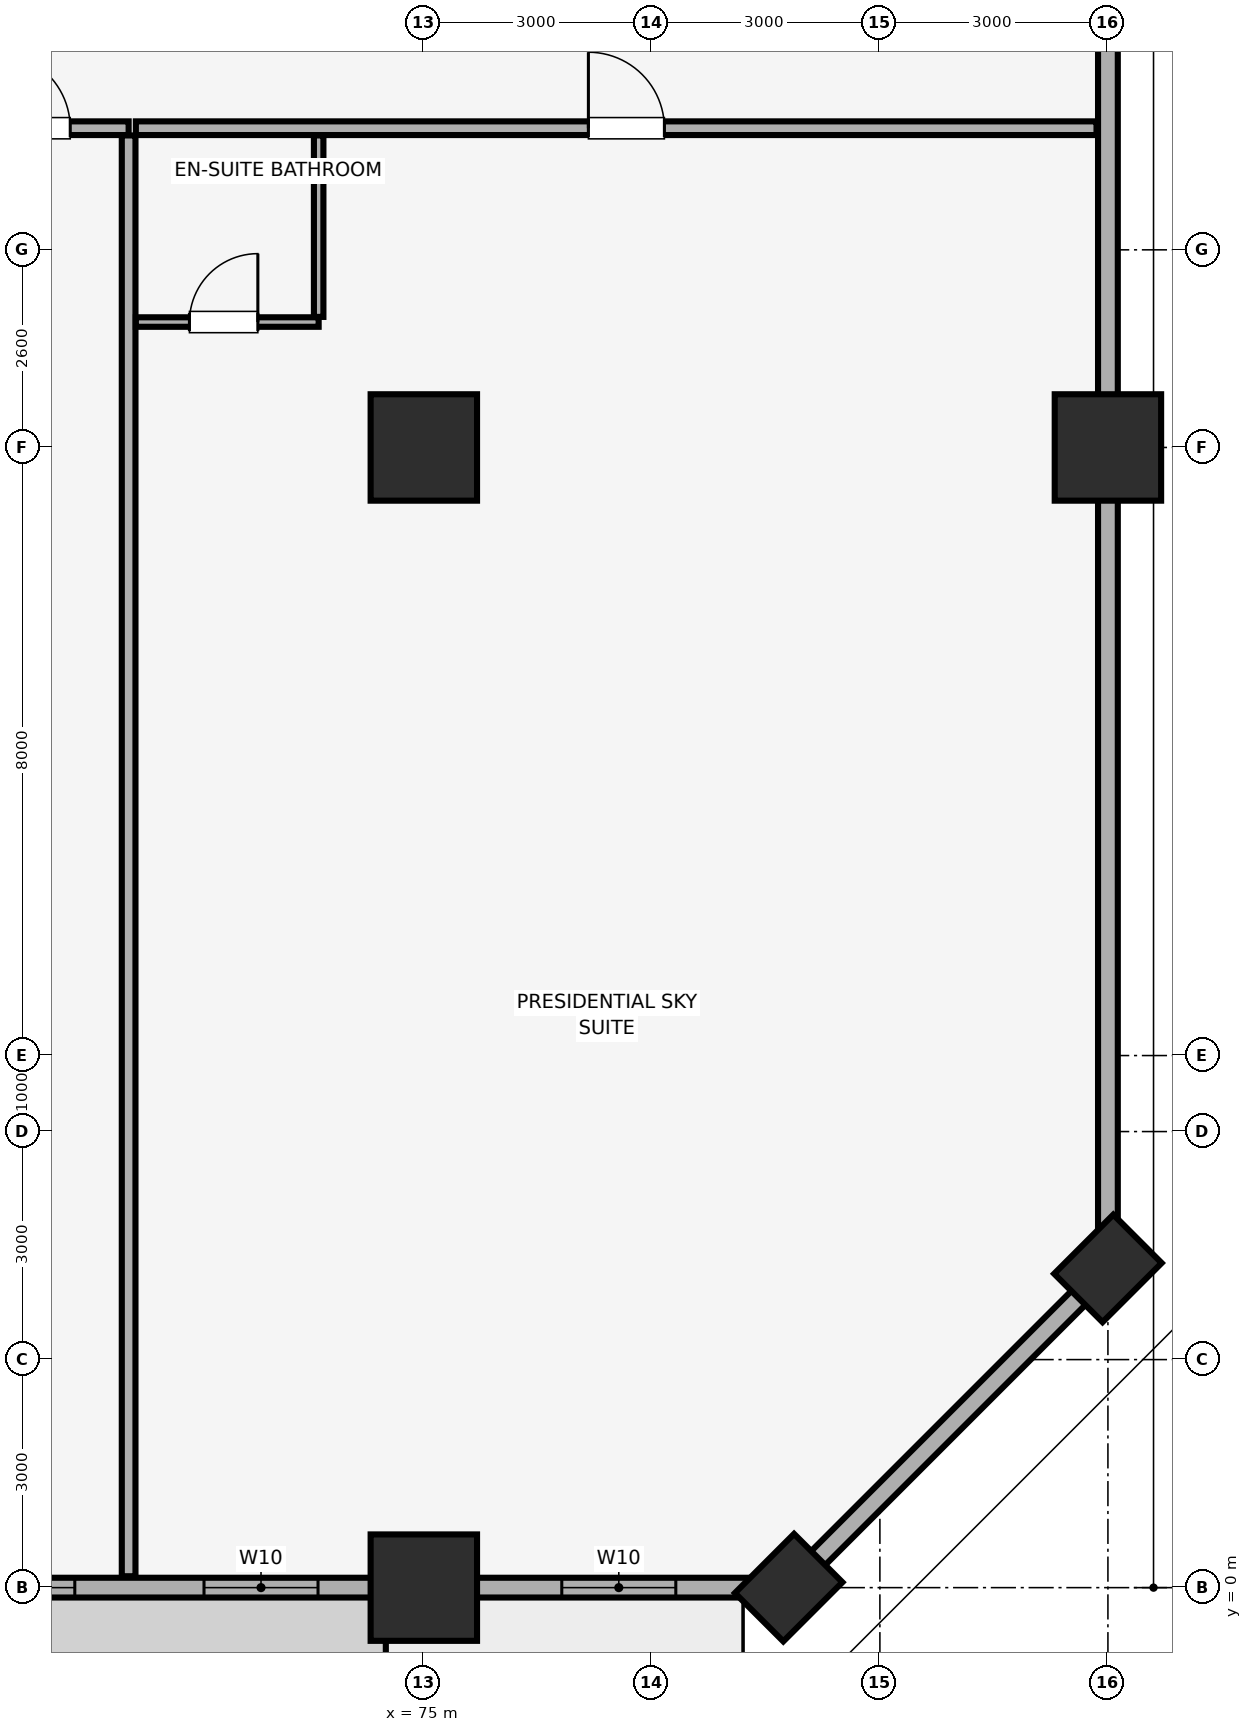
"""IFC4 building model, lengths in metres.
Left out: names, types, materials, properties, quantities, classifications, styles, units other than length and angle.
Written with IfcOpenShell. Run it as: python <this file> out.ifc"""

import sys

from ifc_helpers import new_model, si_unit, direction, frame, frame_2d, origin, origin_2d, place, context, subcontext, project, spatial, rectangle, extrude, element, fill, save


model = new_model("IFC4")
c1 = context("Model", 3, precision=1e-05, world=origin(), true_north=direction((0.0, 1.0)))
c2 = subcontext(c1, "Body", "Model", "MODEL_VIEW")
j1 = project(units=[si_unit("LENGTHUNIT", "METRE"), si_unit("PLANEANGLEUNIT", "RADIAN")], contexts=[c1])
p1 = place(None, origin())
s1 = spatial("IfcSite", under=j1, at=p1, CompositionType="ELEMENT")
p2 = place(p1, origin())
s2 = spatial("IfcBuilding", under=s1, at=p2, CompositionType="ELEMENT")
p3 = place(p2, frame((0.0, 0.0, 76.4)))
s3 = spatial("IfcBuildingStorey", under=s2, at=p3, CompositionType="ELEMENT", Elevation=76.4)
for number, where, z_axis, x_axis in (
    (1, (75.0, 0.0, 0.0), (0.0, 0.0, 1.0), (1.0, 0.0, 0.0)),
    (2, (84.0, 15.0, 0.0), (0.0, 0.0, 1.0), (1.0, 0.0, 0.0)),
):
    element("IfcColumn", number, at=place(p3, frame(where, z_axis=z_axis, x_axis=x_axis)), inside=s3, PredefinedType="COLUMN", context=c2, shape_type="SweptSolid", body=[
        extrude(rectangle(XDim=1.4, YDim=1.4, at=origin_2d()), origin(), (0.0, 0.0, 1.0), 3.4),
    ])
for number, where, z_axis, x_axis in (
    (3, (79.8, 0.0, 0.0), (0.0, 0.0, 1.0), (0.707, 0.707, 0.0)),
    (4, (84.0, 4.2, 0.0), (0.0, 0.0, 1.0), (0.707, 0.707, 0.0)),
):
    element("IfcColumn", number, at=place(p3, frame(where, z_axis=z_axis, x_axis=x_axis)), inside=s3, PredefinedType="PILASTER", context=c2, shape_type="SweptSolid", body=[
        extrude(rectangle(XDim=1.1, YDim=0.9, at=origin_2d()), origin(), (0.0, 0.0, 1.0), 3.4),
    ])
p4 = place(p3, frame((75.0, 15.0, 0.0), z_axis=(0.0, 0.0, 1.0), x_axis=(1.0, 0.0, 0.0)))
e5 = element("IfcColumn", 5, at=p4, inside=s3, PredefinedType="COLUMN", context=c2, shape_type="SweptSolid", body=[
    extrude(rectangle(XDim=1.4, YDim=1.4, at=origin_2d()), origin(), (0.0, 0.0, 1.0), 3.4),
])
p5 = place(p3, frame((4.2, 0.0, 0.0), z_axis=(0.0, 0.0, 1.0), x_axis=(1.0, 0.0, 0.0)))
e6 = element("IfcWall", 6, at=p5, inside=s3, PredefinedType="SOLIDWALL", context=c2, shape_type="SweptSolid", body=[
    extrude(rectangle(XDim=75.6, YDim=0.26, at=frame_2d((37.8, 0.0))), origin(), (0.0, 0.0, 1.0), 2.45),
])
p6 = place(p5, frame((21.383, 0.0, 0.0)))
e7 = element("IfcOpeningElement", 7, at=p6, cuts=e6, PredefinedType="OPENING", context=c2, shape_type="SweptSolid", body=[
    extrude(rectangle(XDim=1.1, YDim=2.15, at=frame_2d((0.55, 1.075))), frame((0.0, 0.14, 0.0), z_axis=(0.0, -1.0, 0.0), x_axis=(1.0, 0.0, 0.0)), (0.0, 0.0, 1.0), 0.28),
])
p7 = place(p5, frame((37.25, 0.0, 0.0)))
e8 = element("IfcOpeningElement", 8, at=p7, cuts=e6, PredefinedType="OPENING", context=c2, shape_type="SweptSolid", body=[
    extrude(rectangle(XDim=1.1, YDim=2.15, at=frame_2d((0.55, 1.075))), frame((0.0, 0.14, 0.0), z_axis=(0.0, -1.0, 0.0), x_axis=(1.0, 0.0, 0.0)), (0.0, 0.0, 1.0), 0.28),
])
p8 = place(p5, frame((53.117, 0.0, 0.0)))
e9 = element("IfcOpeningElement", 9, at=p8, cuts=e6, PredefinedType="OPENING", context=c2, shape_type="SweptSolid", body=[
    extrude(rectangle(XDim=1.1, YDim=2.15, at=frame_2d((0.55, 1.075))), frame((0.0, 0.14, 0.0), z_axis=(0.0, -1.0, 0.0), x_axis=(1.0, 0.0, 0.0)), (0.0, 0.0, 1.0), 0.28),
])
p9 = place(p5, frame((1.485, 0.0, 0.85)))
e10 = element("IfcOpeningElement", 10, at=p9, cuts=e6, PredefinedType="OPENING", context=c2, shape_type="SweptSolid", body=[
    extrude(rectangle(XDim=1.5, YDim=1.4, at=frame_2d((0.75, 0.7))), frame((0.0, 0.14, 0.0), z_axis=(0.0, -1.0, 0.0), x_axis=(1.0, 0.0, 0.0)), (0.0, 0.0, 1.0), 0.28),
])
p10 = place(p5, frame((6.142, 0.0, 0.85)))
e11 = element("IfcOpeningElement", 11, at=p10, cuts=e6, PredefinedType="OPENING", context=c2, shape_type="SweptSolid", body=[
    extrude(rectangle(XDim=1.5, YDim=1.4, at=frame_2d((0.75, 0.7))), frame((0.0, 0.14, 0.0), z_axis=(0.0, -1.0, 0.0), x_axis=(1.0, 0.0, 0.0)), (0.0, 0.0, 1.0), 0.28),
])
p11 = place(p5, frame((9.342, 0.0, 0.85)))
e12 = element("IfcOpeningElement", 12, at=p11, cuts=e6, PredefinedType="OPENING", context=c2, shape_type="SweptSolid", body=[
    extrude(rectangle(XDim=1.5, YDim=1.4, at=frame_2d((0.75, 0.7))), frame((0.0, 0.14, 0.0), z_axis=(0.0, -1.0, 0.0), x_axis=(1.0, 0.0, 0.0)), (0.0, 0.0, 1.0), 0.28),
])
p12 = place(p5, frame((13.908, 0.0, 0.85)))
e13 = element("IfcOpeningElement", 13, at=p12, cuts=e6, PredefinedType="OPENING", context=c2, shape_type="SweptSolid", body=[
    extrude(rectangle(XDim=1.5, YDim=1.4, at=frame_2d((0.75, 0.7))), frame((0.0, 0.14, 0.0), z_axis=(0.0, -1.0, 0.0), x_axis=(1.0, 0.0, 0.0)), (0.0, 0.0, 1.0), 0.28),
])
p13 = place(p5, frame((23.202, 0.0, 0.85)))
e14 = element("IfcOpeningElement", 14, at=p13, cuts=e6, PredefinedType="OPENING", context=c2, shape_type="SweptSolid", body=[
    extrude(rectangle(XDim=1.5, YDim=1.4, at=frame_2d((0.75, 0.7))), frame((0.0, 0.14, 0.0), z_axis=(0.0, -1.0, 0.0), x_axis=(1.0, 0.0, 0.0)), (0.0, 0.0, 1.0), 0.28),
])
p14 = place(p5, frame((29.25, 0.0, 0.85)))
e15 = element("IfcOpeningElement", 15, at=p14, cuts=e6, PredefinedType="OPENING", context=c2, shape_type="SweptSolid", body=[
    extrude(rectangle(XDim=1.5, YDim=1.4, at=frame_2d((0.75, 0.7))), frame((0.0, 0.14, 0.0), z_axis=(0.0, -1.0, 0.0), x_axis=(1.0, 0.0, 0.0)), (0.0, 0.0, 1.0), 0.28),
])
p15 = place(p5, frame((34.79, 0.0, 0.85)))
e16 = element("IfcOpeningElement", 16, at=p15, cuts=e6, PredefinedType="OPENING", context=c2, shape_type="SweptSolid", body=[
    extrude(rectangle(XDim=1.5, YDim=1.4, at=frame_2d((0.75, 0.7))), frame((0.0, 0.14, 0.0), z_axis=(0.0, -1.0, 0.0), x_axis=(1.0, 0.0, 0.0)), (0.0, 0.0, 1.0), 0.28),
])
p16 = place(p5, frame((39.31, 0.0, 0.85)))
e17 = element("IfcOpeningElement", 17, at=p16, cuts=e6, PredefinedType="OPENING", context=c2, shape_type="SweptSolid", body=[
    extrude(rectangle(XDim=1.5, YDim=1.4, at=frame_2d((0.75, 0.7))), frame((0.0, 0.14, 0.0), z_axis=(0.0, -1.0, 0.0), x_axis=(1.0, 0.0, 0.0)), (0.0, 0.0, 1.0), 0.28),
])
p17 = place(p5, frame((44.85, 0.0, 0.85)))
e18 = element("IfcOpeningElement", 18, at=p17, cuts=e6, PredefinedType="OPENING", context=c2, shape_type="SweptSolid", body=[
    extrude(rectangle(XDim=1.5, YDim=1.4, at=frame_2d((0.75, 0.7))), frame((0.0, 0.14, 0.0), z_axis=(0.0, -1.0, 0.0), x_axis=(1.0, 0.0, 0.0)), (0.0, 0.0, 1.0), 0.28),
])
p18 = place(p5, frame((50.848, 0.0, 0.85)))
e19 = element("IfcOpeningElement", 19, at=p18, cuts=e6, PredefinedType="OPENING", context=c2, shape_type="SweptSolid", body=[
    extrude(rectangle(XDim=1.5, YDim=1.4, at=frame_2d((0.75, 0.7))), frame((0.0, 0.14, 0.0), z_axis=(0.0, -1.0, 0.0), x_axis=(1.0, 0.0, 0.0)), (0.0, 0.0, 1.0), 0.28),
])
p19 = place(p5, frame((60.142, 0.0, 0.85)))
e20 = element("IfcOpeningElement", 20, at=p19, cuts=e6, PredefinedType="OPENING", context=c2, shape_type="SweptSolid", body=[
    extrude(rectangle(XDim=1.5, YDim=1.4, at=frame_2d((0.75, 0.7))), frame((0.0, 0.14, 0.0), z_axis=(0.0, -1.0, 0.0), x_axis=(1.0, 0.0, 0.0)), (0.0, 0.0, 1.0), 0.28),
])
p20 = place(p5, frame((64.708, 0.0, 0.85)))
e21 = element("IfcOpeningElement", 21, at=p20, cuts=e6, PredefinedType="OPENING", context=c2, shape_type="SweptSolid", body=[
    extrude(rectangle(XDim=1.5, YDim=1.4, at=frame_2d((0.75, 0.7))), frame((0.0, 0.14, 0.0), z_axis=(0.0, -1.0, 0.0), x_axis=(1.0, 0.0, 0.0)), (0.0, 0.0, 1.0), 0.28),
])
p21 = place(p5, frame((67.908, 0.0, 0.85)))
e22 = element("IfcOpeningElement", 22, at=p21, cuts=e6, PredefinedType="OPENING", context=c2, shape_type="SweptSolid", body=[
    extrude(rectangle(XDim=1.5, YDim=1.4, at=frame_2d((0.75, 0.7))), frame((0.0, 0.14, 0.0), z_axis=(0.0, -1.0, 0.0), x_axis=(1.0, 0.0, 0.0)), (0.0, 0.0, 1.0), 0.28),
])
p22 = place(p5, frame((72.615, 0.0, 0.85)))
e23 = element("IfcOpeningElement", 23, at=p22, cuts=e6, PredefinedType="OPENING", context=c2, shape_type="SweptSolid", body=[
    extrude(rectangle(XDim=1.5, YDim=1.4, at=frame_2d((0.75, 0.7))), frame((0.0, 0.14, 0.0), z_axis=(0.0, -1.0, 0.0), x_axis=(1.0, 0.0, 0.0)), (0.0, 0.0, 1.0), 0.28),
])
p23 = place(p3, frame((79.8, 0.0, 0.0), z_axis=(0.0, 0.0, 1.0), x_axis=(0.707106781187, 0.707106781187, 0.0)))
e24 = element("IfcWall", 24, at=p23, inside=s3, PredefinedType="SOLIDWALL", context=c2, shape_type="SweptSolid", body=[
    extrude(rectangle(XDim=5.94, YDim=0.26, at=frame_2d((2.97, 0.0))), origin(), (0.0, 0.0, 1.0), 2.45),
])
p24 = place(p3, frame((84.0, 4.2, 0.0), z_axis=(0.0, 0.0, 1.0), x_axis=(0.0, 1.0, 0.0)))
e25 = element("IfcWall", 25, at=p24, inside=s3, PredefinedType="SOLIDWALL", context=c2, shape_type="SweptSolid", body=[
    extrude(rectangle(XDim=40.6, YDim=0.26, at=frame_2d((20.3, 0.0))), origin(), (0.0, 0.0, 1.0), 2.45),
])
p25 = place(p3, frame((62.878, 19.2, 0.0), z_axis=(0.0, 0.0, 1.0), x_axis=(1.0, 0.0, 0.0)))
e26 = element("IfcWall", 26, at=p25, inside=s3, PredefinedType="PARTITIONING", context=c2, shape_type="SweptSolid", body=[
    extrude(rectangle(XDim=8.238, YDim=0.18, at=frame_2d((4.119, 0.0))), origin(), (0.0, 0.0, 1.0), 3.4),
])
p26 = place(p25, frame((6.47, 0.0, 0.0)))
e27 = element("IfcOpeningElement", 27, at=p26, cuts=e26, PredefinedType="OPENING", context=c2, shape_type="SweptSolid", body=[
    extrude(rectangle(XDim=1.0, YDim=2.15, at=frame_2d((0.5, 1.075))), frame((0.0, 0.1, 0.0), z_axis=(0.0, -1.0, 0.0), x_axis=(1.0, 0.0, 0.0)), (0.0, 0.0, 1.0), 0.2),
])
p27 = place(p3, frame((71.116, 0.15, 0.0), z_axis=(0.0, 0.0, 1.0), x_axis=(0.0, 1.0, 0.0)))
e28 = element("IfcWall", 28, at=p27, inside=s3, PredefinedType="PARTITIONING", context=c2, shape_type="SweptSolid", body=[
    extrude(rectangle(XDim=18.955, YDim=0.18, at=frame_2d((9.478, 0.0))), origin(), (0.0, 0.0, 1.0), 3.4),
])
p28 = place(p3, frame((71.211, 19.2, 0.0), z_axis=(0.0, 0.0, 1.0), x_axis=(1.0, 0.0, 0.0)))
e29 = element("IfcWall", 29, at=p28, inside=s3, PredefinedType="PARTITIONING", context=c2, shape_type="SweptSolid", body=[
    extrude(rectangle(XDim=12.639, YDim=0.18, at=frame_2d((6.319, 0.0))), origin(), (0.0, 0.0, 1.0), 3.4),
])
p29 = place(p28, frame((5.954, 0.0, 0.0)))
e30 = element("IfcOpeningElement", 30, at=p29, cuts=e29, PredefinedType="OPENING", context=c2, shape_type="SweptSolid", body=[
    extrude(rectangle(XDim=1.0, YDim=2.15, at=frame_2d((0.5, 1.075))), frame((0.0, 0.1, 0.0), z_axis=(0.0, -1.0, 0.0), x_axis=(1.0, 0.0, 0.0)), (0.0, 0.0, 1.0), 0.2),
])
p30 = place(p3, frame((71.211, 16.65, 0.0), z_axis=(0.0, 0.0, 1.0), x_axis=(1.0, 0.0, 0.0)))
e31 = element("IfcWall", 31, at=p30, inside=s3, PredefinedType="PARTITIONING", context=c2, shape_type="SweptSolid", body=[
    extrude(rectangle(XDim=2.405, YDim=0.125, at=frame_2d((1.203, 0.0))), origin(), (0.0, 0.0, 1.0), 3.4),
])
p31 = place(p30, frame((0.705, 0.0, 0.0)))
e32 = element("IfcOpeningElement", 32, at=p31, cuts=e31, PredefinedType="OPENING", context=c2, shape_type="SweptSolid", body=[
    extrude(rectangle(XDim=0.9, YDim=2.1, at=frame_2d((0.45, 1.05))), frame((0.0, 0.073, 0.0), z_axis=(0.0, -1.0, 0.0), x_axis=(1.0, 0.0, 0.0)), (0.0, 0.0, 1.0), 0.145),
])
p32 = place(p3, frame((73.616, 16.718, 0.0), z_axis=(0.0, 0.0, 1.0), x_axis=(0.0, 1.0, 0.0)))
e33 = element("IfcWall", 33, at=p32, inside=s3, PredefinedType="PARTITIONING", context=c2, shape_type="SweptSolid", body=[
    extrude(rectangle(XDim=2.387, YDim=0.125, at=frame_2d((1.194, 0.0))), origin(), (0.0, 0.0, 1.0), 3.4),
])
p33 = place(p20, origin())
e34 = element("IfcWindow", 34, at=p33, inside=s3, PartitioningType="SINGLE_PANEL", PredefinedType="WINDOW", context=c2, shape_type="SweptSolid", body=[
    extrude(rectangle(XDim=1.5, YDim=1.4, at=frame_2d((0.75, 0.7))), frame((0.0, 0.03, 0.0), z_axis=(0.0, -1.0, 0.0), x_axis=(1.0, 0.0, 0.0)), (0.0, 0.0, 1.0), 0.06),
])
fill(e21, e34)
p34 = place(p21, origin())
e35 = element("IfcWindow", 35, at=p34, inside=s3, PartitioningType="SINGLE_PANEL", PredefinedType="WINDOW", context=c2, shape_type="SweptSolid", body=[
    extrude(rectangle(XDim=1.5, YDim=1.4, at=frame_2d((0.75, 0.7))), frame((0.0, 0.03, 0.0), z_axis=(0.0, -1.0, 0.0), x_axis=(1.0, 0.0, 0.0)), (0.0, 0.0, 1.0), 0.06),
])
fill(e22, e35)
p35 = place(p22, origin())
e36 = element("IfcWindow", 36, at=p35, inside=s3, PartitioningType="SINGLE_PANEL", PredefinedType="WINDOW", context=c2, shape_type="SweptSolid", body=[
    extrude(rectangle(XDim=1.5, YDim=1.4, at=frame_2d((0.75, 0.7))), frame((0.0, 0.03, 0.0), z_axis=(0.0, -1.0, 0.0), x_axis=(1.0, 0.0, 0.0)), (0.0, 0.0, 1.0), 0.06),
])
fill(e23, e36)
p36 = place(p26, origin())
e37 = element("IfcDoor", 37, at=p36, inside=s3, OperationType="SINGLE_SWING_LEFT", PredefinedType="DOOR", context=c2, shape_type="SweptSolid", body=[
    extrude(rectangle(XDim=1.0, YDim=2.15, at=frame_2d((0.5, 1.075))), frame((0.0, 0.025, 0.0), z_axis=(0.0, -1.0, 0.0), x_axis=(1.0, 0.0, 0.0)), (0.0, 0.0, 1.0), 0.05),
])
fill(e27, e37)
p37 = place(p29, origin())
e38 = element("IfcDoor", 38, at=p37, inside=s3, OperationType="SINGLE_SWING_LEFT", PredefinedType="DOOR", context=c2, shape_type="SweptSolid", body=[
    extrude(rectangle(XDim=1.0, YDim=2.15, at=frame_2d((0.5, 1.075))), frame((0.0, 0.025, 0.0), z_axis=(0.0, -1.0, 0.0), x_axis=(1.0, 0.0, 0.0)), (0.0, 0.0, 1.0), 0.05),
])
fill(e30, e38)
p38 = place(p31, origin())
e39 = element("IfcDoor", 39, at=p38, inside=s3, OperationType="SINGLE_SWING_RIGHT", PredefinedType="DOOR", context=c2, shape_type="SweptSolid", body=[
    extrude(rectangle(XDim=0.9, YDim=2.1, at=frame_2d((0.45, 1.05))), frame((0.0, 0.025, 0.0), z_axis=(0.0, -1.0, 0.0), x_axis=(1.0, 0.0, 0.0)), (0.0, 0.0, 1.0), 0.05),
])
fill(e32, e39)
save(model, sys.argv[1])
